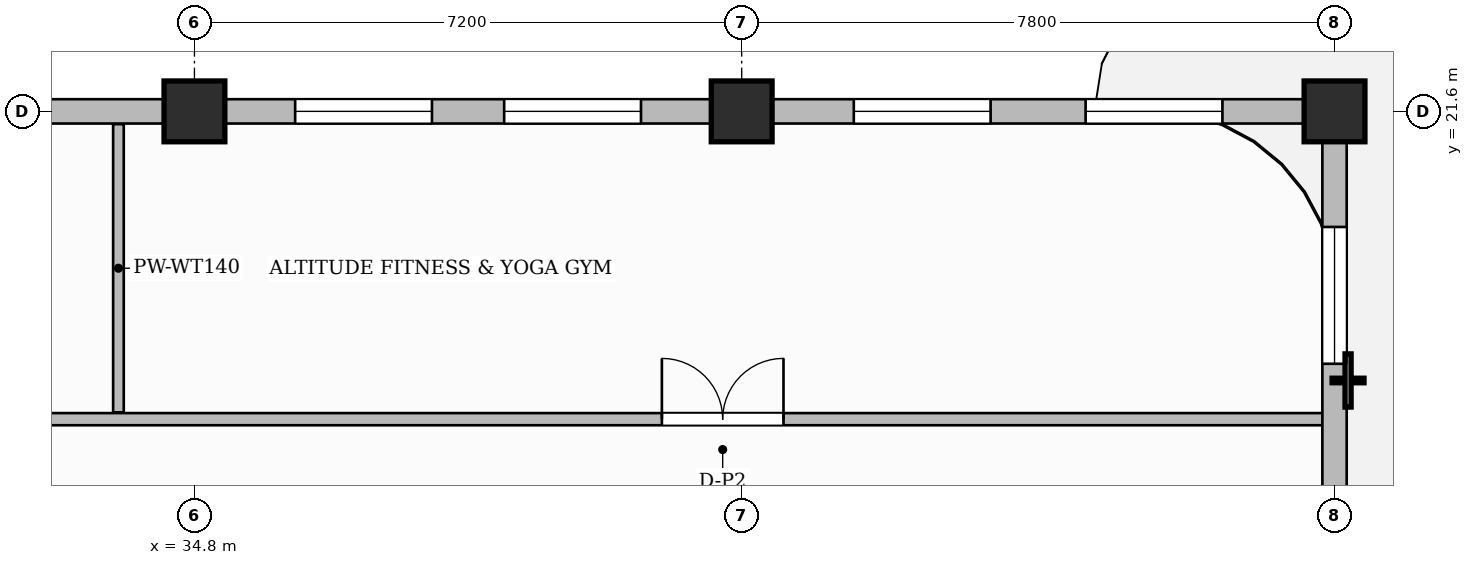
"""IFC4 building model, lengths in metres.
Left out: names, types, materials, properties, quantities, classifications, styles, units other than length and angle.
Written with IfcOpenShell. Run it as: python <this file> out.ifc"""

import sys

from ifc_helpers import new_model, si_unit, direction, frame, frame_2d, origin, origin_2d, place, context, subcontext, project, spatial, rectangle, extrude, source, transform, mapped, element, fill, save


model = new_model("IFC4")
c1 = context("Model", 3, precision=1e-05, world=origin(), true_north=direction((0.0, 1.0)))
c2 = subcontext(c1, "Body", "Model", "MODEL_VIEW")
j1 = project(units=[si_unit("LENGTHUNIT", "METRE"), si_unit("PLANEANGLEUNIT", "RADIAN")], contexts=[c1])
p1 = place(None, origin())
s1 = spatial("IfcSite", under=j1, at=p1, CompositionType="ELEMENT")
p2 = place(p1, origin())
s2 = spatial("IfcBuilding", under=s1, at=p2, CompositionType="ELEMENT")
p3 = place(p2, frame((0.0, 0.0, 263.5)))
s3 = spatial("IfcBuildingStorey", under=s2, at=p3, CompositionType="ELEMENT", Elevation=263.5)
m1 = source(origin(), c2, "Body", "SweptSolid", [
    extrude(rectangle(XDim=0.8, YDim=0.8, at=origin_2d()), origin(), (0.0, 0.0, 1.0), 3.85),
])
for number, where, z_axis, x_axis in (
    (1, (34.8, 21.6, 0.0), (0.0, 0.0, 1.0), (1.0, 0.0, 0.0)),
    (2, (42.0, 21.6, 0.0), (0.0, 0.0, 1.0), (1.0, 0.0, 0.0)),
    (3, (49.8, 21.6, 0.0), (0.0, 0.0, 1.0), (1.0, 0.0, 0.0)),
):
    element("IfcColumn", number, at=place(p3, frame(where, z_axis=z_axis, x_axis=x_axis)), inside=s3, PredefinedType="COLUMN", context=c2, shape_type="MappedRepresentation", body=[
        mapped(m1, transform((0.0, 0.0, 0.0), scale=1.0)),
    ])
p4 = place(p3, frame((30.29, 17.55, 0.0), z_axis=(0.0, 0.0, 1.0), x_axis=(1.0, 0.0, 0.0)))
e4 = element("IfcWall", 4, at=p4, inside=s3, PredefinedType="PARTITIONING", context=c2, shape_type="SweptSolid", body=[
    extrude(rectangle(XDim=19.37, YDim=0.16, at=frame_2d((9.685, 0.0))), origin(), (0.0, 0.0, 1.0), 3.6),
])
p5 = place(p4, frame((1.285, 0.0, 0.0)))
e5 = element("IfcOpeningElement", 5, at=p5, cuts=e4, PredefinedType="OPENING", context=c2, shape_type="SweptSolid", body=[
    extrude(rectangle(XDim=0.85, YDim=2.1, at=frame_2d((0.425, 1.05))), frame((0.0, 0.09, 0.0), z_axis=(0.0, -1.0, 0.0), x_axis=(1.0, 0.0, 0.0)), (0.0, 0.0, 1.0), 0.18),
])
p6 = place(p4, frame((10.66, 0.0, 0.0)))
e6 = element("IfcOpeningElement", 6, at=p6, cuts=e4, PredefinedType="OPENING", context=c2, shape_type="SweptSolid", body=[
    extrude(rectangle(XDim=1.6, YDim=2.4, at=frame_2d((0.8, 1.2))), frame((0.0, 0.09, 0.0), z_axis=(0.0, -1.0, 0.0), x_axis=(1.0, 0.0, 0.0)), (0.0, 0.0, 1.0), 0.18),
])
p7 = place(p3, frame((33.8, 17.64, 0.0), z_axis=(0.0, 0.0, 1.0), x_axis=(0.0, 1.0, 0.0)))
e7 = element("IfcWall", 7, at=p7, inside=s3, PredefinedType="PARTITIONING", context=c2, shape_type="SweptSolid", body=[
    extrude(rectangle(XDim=3.792, YDim=0.14, at=frame_2d((1.896, 0.0))), origin(), (0.0, 0.0, 1.0), 3.6),
])
p8 = place(p3, frame((49.8, 14.62, 0.0), z_axis=(0.0, 0.0, 1.0), x_axis=(0.0, 1.0, 0.0)))
e8 = element("IfcWall", 8, at=p8, inside=s3, PredefinedType="SOLIDWALL", context=c2, shape_type="SweptSolid", body=[
    extrude(rectangle(XDim=6.93, YDim=0.32, at=frame_2d((3.465, 0.0))), origin(), (0.0, 0.0, 1.0), 3.185),
])
p9 = place(p8, frame((0.42, 0.0, 0.0)))
e9 = element("IfcOpeningElement", 9, at=p9, cuts=e8, PredefinedType="OPENING", context=c2, shape_type="SweptSolid", body=[
    extrude(rectangle(XDim=1.2, YDim=2.2, at=frame_2d((0.6, 1.1))), frame((0.0, 0.17, 0.0), z_axis=(0.0, -1.0, 0.0), x_axis=(1.0, 0.0, 0.0)), (0.0, 0.0, 1.0), 0.34),
])
p10 = place(p8, frame((3.659, 0.0, 0.8)))
e10 = element("IfcOpeningElement", 10, at=p10, cuts=e8, PredefinedType="OPENING", context=c2, shape_type="SweptSolid", body=[
    extrude(rectangle(XDim=1.8, YDim=1.85, at=frame_2d((0.9, 0.925))), frame((0.0, 0.17, 0.0), z_axis=(0.0, -1.0, 0.0), x_axis=(1.0, 0.0, 0.0)), (0.0, 0.0, 1.0), 0.34),
])
p11 = place(p3, frame((18.0, 21.6, 0.0), z_axis=(0.0, 0.0, 1.0), x_axis=(1.0, 0.0, 0.0)))
e11 = element("IfcWall", 11, at=p11, inside=s3, PredefinedType="SOLIDWALL", context=c2, shape_type="SweptSolid", body=[
    extrude(rectangle(XDim=31.8, YDim=0.32, at=frame_2d((15.9, 0.0))), origin(), (0.0, 0.0, 1.0), 3.185),
])
p12 = place(p11, frame((0.42, 0.0, 0.0)))
e12 = element("IfcOpeningElement", 12, at=p12, cuts=e11, PredefinedType="OPENING", context=c2, shape_type="SweptSolid", body=[
    extrude(rectangle(XDim=1.2, YDim=2.2, at=frame_2d((0.6, 1.1))), frame((0.0, 0.17, 0.0), z_axis=(0.0, -1.0, 0.0), x_axis=(1.0, 0.0, 0.0)), (0.0, 0.0, 1.0), 0.34),
])
p13 = place(p11, frame((4.581, 0.0, 0.8)))
e13 = element("IfcOpeningElement", 13, at=p13, cuts=e11, PredefinedType="OPENING", context=c2, shape_type="SweptSolid", body=[
    extrude(rectangle(XDim=0.95, YDim=1.75, at=frame_2d((0.475, 0.875))), frame((0.0, 0.17, 0.0), z_axis=(0.0, -1.0, 0.0), x_axis=(1.0, 0.0, 0.0)), (0.0, 0.0, 1.0), 0.34),
])
p14 = place(p11, frame((6.3, 0.0, 0.8)))
e14 = element("IfcOpeningElement", 14, at=p14, cuts=e11, PredefinedType="OPENING", context=c2, shape_type="SweptSolid", body=[
    extrude(rectangle(XDim=1.8, YDim=1.85, at=frame_2d((0.9, 0.925))), frame((0.0, 0.17, 0.0), z_axis=(0.0, -1.0, 0.0), x_axis=(1.0, 0.0, 0.0)), (0.0, 0.0, 1.0), 0.34),
])
p15 = place(p11, frame((8.869, 0.0, 0.8)))
e15 = element("IfcOpeningElement", 15, at=p15, cuts=e11, PredefinedType="OPENING", context=c2, shape_type="SweptSolid", body=[
    extrude(rectangle(XDim=0.95, YDim=1.75, at=frame_2d((0.475, 0.875))), frame((0.0, 0.17, 0.0), z_axis=(0.0, -1.0, 0.0), x_axis=(1.0, 0.0, 0.0)), (0.0, 0.0, 1.0), 0.34),
])
p16 = place(p11, frame((13.101, 0.0, 0.8)))
e16 = element("IfcOpeningElement", 16, at=p16, cuts=e11, PredefinedType="OPENING", context=c2, shape_type="SweptSolid", body=[
    extrude(rectangle(XDim=1.8, YDim=1.85, at=frame_2d((0.9, 0.925))), frame((0.0, 0.17, 0.0), z_axis=(0.0, -1.0, 0.0), x_axis=(1.0, 0.0, 0.0)), (0.0, 0.0, 1.0), 0.34),
])
p17 = place(p11, frame((18.125, 0.0, 0.8)))
e17 = element("IfcOpeningElement", 17, at=p17, cuts=e11, PredefinedType="OPENING", context=c2, shape_type="SweptSolid", body=[
    extrude(rectangle(XDim=1.8, YDim=1.85, at=frame_2d((0.9, 0.925))), frame((0.0, 0.17, 0.0), z_axis=(0.0, -1.0, 0.0), x_axis=(1.0, 0.0, 0.0)), (0.0, 0.0, 1.0), 0.34),
])
p18 = place(p11, frame((20.875, 0.0, 0.8)))
e18 = element("IfcOpeningElement", 18, at=p18, cuts=e11, PredefinedType="OPENING", context=c2, shape_type="SweptSolid", body=[
    extrude(rectangle(XDim=1.8, YDim=1.85, at=frame_2d((0.9, 0.925))), frame((0.0, 0.17, 0.0), z_axis=(0.0, -1.0, 0.0), x_axis=(1.0, 0.0, 0.0)), (0.0, 0.0, 1.0), 0.34),
])
p19 = place(p11, frame((25.475, 0.0, 0.8)))
e19 = element("IfcOpeningElement", 19, at=p19, cuts=e11, PredefinedType="OPENING", context=c2, shape_type="SweptSolid", body=[
    extrude(rectangle(XDim=1.8, YDim=1.85, at=frame_2d((0.9, 0.925))), frame((0.0, 0.17, 0.0), z_axis=(0.0, -1.0, 0.0), x_axis=(1.0, 0.0, 0.0)), (0.0, 0.0, 1.0), 0.34),
])
p20 = place(p11, frame((28.525, 0.0, 0.8)))
e20 = element("IfcOpeningElement", 20, at=p20, cuts=e11, PredefinedType="OPENING", context=c2, shape_type="SweptSolid", body=[
    extrude(rectangle(XDim=1.8, YDim=1.85, at=frame_2d((0.9, 0.925))), frame((0.0, 0.17, 0.0), z_axis=(0.0, -1.0, 0.0), x_axis=(1.0, 0.0, 0.0)), (0.0, 0.0, 1.0), 0.34),
])
m2 = source(origin(), c2, "Body", "SweptSolid", [
    extrude(rectangle(XDim=1.6, YDim=2.4, at=frame_2d((0.8, 1.2))), frame((0.0, 0.025, 0.0), z_axis=(0.0, -1.0, 0.0), x_axis=(1.0, 0.0, 0.0)), (0.0, 0.0, 1.0), 0.05),
])
p21 = place(p6, origin())
e21 = element("IfcDoor", 21, at=p21, inside=s3, OperationType="DOUBLE_DOOR_SINGLE_SWING", PredefinedType="DOOR", context=c2, shape_type="MappedRepresentation", body=[
    mapped(m2, transform((0.0, 0.0, 0.0), scale=1.0)),
])
fill(e6, e21)
m3 = source(origin(), c2, "Body", "SweptSolid", [
    extrude(rectangle(XDim=1.8, YDim=1.85, at=frame_2d((0.9, 0.925))), frame((0.0, 0.03, 0.0), z_axis=(0.0, -1.0, 0.0), x_axis=(1.0, 0.0, 0.0)), (0.0, 0.0, 1.0), 0.06),
])
p22 = place(p10, origin())
e22 = element("IfcWindow", 22, at=p22, inside=s3, PartitioningType="DOUBLE_PANEL_VERTICAL", PredefinedType="WINDOW", context=c2, shape_type="MappedRepresentation", body=[
    mapped(m3, transform((0.0, 0.0, 0.0), scale=1.0)),
])
fill(e10, e22)
p23 = place(p17, origin())
e23 = element("IfcWindow", 23, at=p23, inside=s3, PartitioningType="DOUBLE_PANEL_VERTICAL", PredefinedType="WINDOW", context=c2, shape_type="MappedRepresentation", body=[
    mapped(m3, transform((0.0, 0.0, 0.0), scale=1.0)),
])
fill(e17, e23)
p24 = place(p18, origin())
e24 = element("IfcWindow", 24, at=p24, inside=s3, PartitioningType="DOUBLE_PANEL_VERTICAL", PredefinedType="WINDOW", context=c2, shape_type="MappedRepresentation", body=[
    mapped(m3, transform((0.0, 0.0, 0.0), scale=1.0)),
])
fill(e18, e24)
p25 = place(p19, origin())
e25 = element("IfcWindow", 25, at=p25, inside=s3, PartitioningType="DOUBLE_PANEL_VERTICAL", PredefinedType="WINDOW", context=c2, shape_type="MappedRepresentation", body=[
    mapped(m3, transform((0.0, 0.0, 0.0), scale=1.0)),
])
fill(e19, e25)
p26 = place(p20, origin())
e26 = element("IfcWindow", 26, at=p26, inside=s3, PartitioningType="DOUBLE_PANEL_VERTICAL", PredefinedType="WINDOW", context=c2, shape_type="MappedRepresentation", body=[
    mapped(m3, transform((0.0, 0.0, 0.0), scale=1.0)),
])
fill(e20, e26)
save(model, sys.argv[1])
